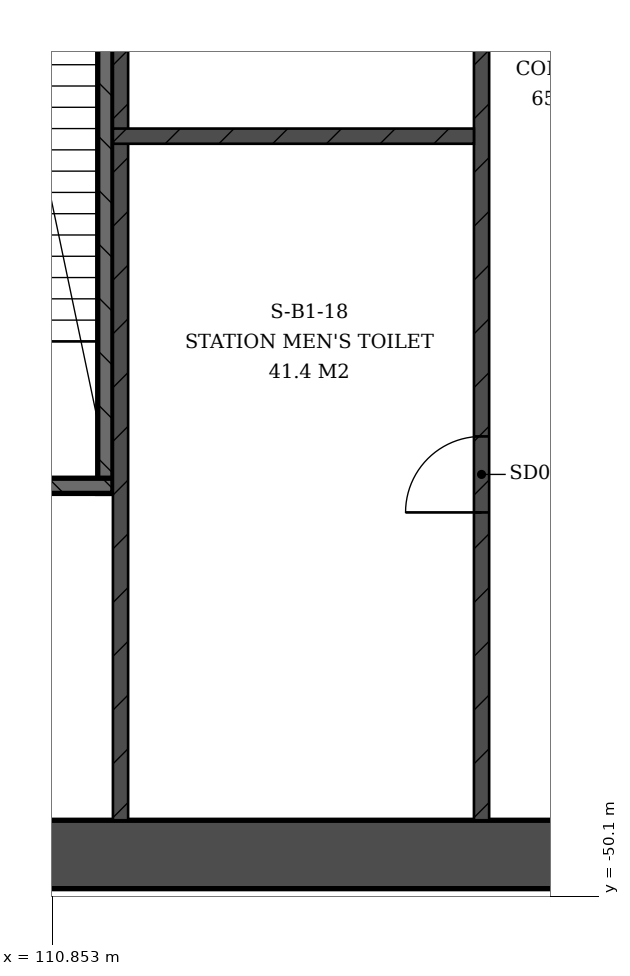
"""IFC4 building model, lengths in metres.
Left out: names, types, materials, properties, quantities, classifications, styles, units other than length and angle.
Written with IfcOpenShell. Run it as: python <this file> out.ifc"""

import sys

from ifc_helpers import new_model, si_unit, direction, frame, frame_2d, origin, place, context, subcontext, project, spatial, rectangle, extrude, element, fill, save


model = new_model("IFC4")
c1 = context("Model", 3, precision=1e-05, world=origin(), true_north=direction((0.0, 1.0)))
c2 = subcontext(c1, "Body", "Model", "MODEL_VIEW")
j1 = project(units=[si_unit("LENGTHUNIT", "METRE"), si_unit("PLANEANGLEUNIT", "RADIAN")], contexts=[c1])
p1 = place(None, origin())
s1 = spatial("IfcSite", under=j1, at=p1, CompositionType="ELEMENT")
p2 = place(p1, origin())
s2 = spatial("IfcBuilding", under=s1, at=p2, CompositionType="ELEMENT")
p3 = place(p2, frame((0.0, 0.0, -4.5)))
s3 = spatial("IfcBuildingStorey", under=s2, at=p3, CompositionType="ELEMENT", Elevation=-4.5)
p4 = place(p3, frame((95.9, -49.55, 0.0), z_axis=(0.0, 0.0, 1.0), x_axis=(1.0, 0.0, 0.0)))
e1 = element("IfcWall", 1, at=p4, inside=s3, PredefinedType="STANDARD", context=c2, shape_type="SweptSolid", body=[
    extrude(rectangle(XDim=23.2, YDim=0.9, at=frame_2d((11.6, 0.0))), origin(), (0.0, 0.0, 1.0), 3.5),
])
p5 = place(p3, frame((111.55, -44.8, 0.0), z_axis=(0.0, 0.0, 1.0), x_axis=(0.0, 1.0, 0.0)))
e2 = element("IfcWall", 2, at=p5, inside=s3, PredefinedType="SHEAR", context=c2, shape_type="SweptSolid", body=[
    extrude(rectangle(XDim=20.0, YDim=0.2, at=frame_2d((10.0, 0.0))), origin(), (0.0, 0.0, 1.0), 3.5),
])
p6 = place(p3, frame((108.45, -44.7, 0.0), z_axis=(0.0, 0.0, 1.0), x_axis=(1.0, 0.0, 0.0)))
e3 = element("IfcWall", 3, at=p6, inside=s3, PredefinedType="SHEAR", context=c2, shape_type="SweptSolid", body=[
    extrude(rectangle(XDim=3.2, YDim=0.2, at=frame_2d((1.6, 0.0))), origin(), (0.0, 0.0, 1.0), 3.5),
])
p7 = place(p3, frame((116.5, -49.1, 0.0), z_axis=(0.0, 0.0, 1.0), x_axis=(0.0, 1.0, 0.0)))
e4 = element("IfcWall", 4, at=p7, inside=s3, PredefinedType="PARTITIONING", context=c2, shape_type="SweptSolid", body=[
    extrude(rectangle(XDim=26.1, YDim=0.2, at=frame_2d((13.05, 0.0))), origin(), (0.0, 0.0, 1.0), 3.5),
])
p8 = place(p7, frame((4.05, 0.0, 0.0)))
e5 = element("IfcOpeningElement", 5, at=p8, cuts=e4, PredefinedType="OPENING", context=c2, shape_type="SweptSolid", body=[
    extrude(rectangle(XDim=1.0, YDim=2.1, at=frame_2d((0.5, 1.05))), frame((0.0, 0.1, 0.0), z_axis=(0.0, -1.0, 0.0), x_axis=(1.0, 0.0, 0.0)), (0.0, 0.0, 1.0), 0.2),
])
p9 = place(p7, frame((13.0, 0.0, 0.0)))
e6 = element("IfcOpeningElement", 6, at=p9, cuts=e4, PredefinedType="OPENING", context=c2, shape_type="SweptSolid", body=[
    extrude(rectangle(XDim=1.0, YDim=2.1, at=frame_2d((0.5, 1.05))), frame((0.0, 0.1, 0.0), z_axis=(0.0, -1.0, 0.0), x_axis=(1.0, 0.0, 0.0)), (0.0, 0.0, 1.0), 0.2),
])
p10 = place(p7, frame((21.5, 0.0, 0.0)))
e7 = element("IfcOpeningElement", 7, at=p10, cuts=e4, PredefinedType="OPENING", context=c2, shape_type="SweptSolid", body=[
    extrude(rectangle(XDim=1.0, YDim=2.1, at=frame_2d((0.5, 1.05))), frame((0.0, 0.1, 0.0), z_axis=(0.0, -1.0, 0.0), x_axis=(1.0, 0.0, 0.0)), (0.0, 0.0, 1.0), 0.2),
])
p11 = place(p3, frame((111.75, -49.1, 0.0), z_axis=(0.0, 0.0, 1.0), x_axis=(0.0, 1.0, 0.0)))
e8 = element("IfcWall", 8, at=p11, inside=s3, PredefinedType="PARTITIONING", context=c2, shape_type="SweptSolid", body=[
    extrude(rectangle(XDim=26.1, YDim=0.2, at=frame_2d((13.05, 0.0))), origin(), (0.0, 0.0, 1.0), 3.5),
])
p12 = place(p3, frame((111.65, -40.1, 0.0), z_axis=(0.0, 0.0, 1.0), x_axis=(1.0, 0.0, 0.0)))
e9 = element("IfcWall", 9, at=p12, inside=s3, PredefinedType="PARTITIONING", context=c2, shape_type="SweptSolid", body=[
    extrude(rectangle(XDim=4.75, YDim=0.2, at=frame_2d((2.375, 0.0))), origin(), (0.0, 0.0, 1.0), 3.5),
])
p13 = place(p8, origin())
e10 = element("IfcDoor", 10, at=p13, inside=s3, OperationType="SINGLE_SWING_RIGHT", PredefinedType="DOOR", context=c2, shape_type="SweptSolid", body=[
    extrude(rectangle(XDim=1.0, YDim=2.1, at=frame_2d((0.5, 1.05))), frame((0.0, 0.025, 0.0), z_axis=(0.0, -1.0, 0.0), x_axis=(1.0, 0.0, 0.0)), (0.0, 0.0, 1.0), 0.05),
])
fill(e5, e10)
save(model, sys.argv[1])
